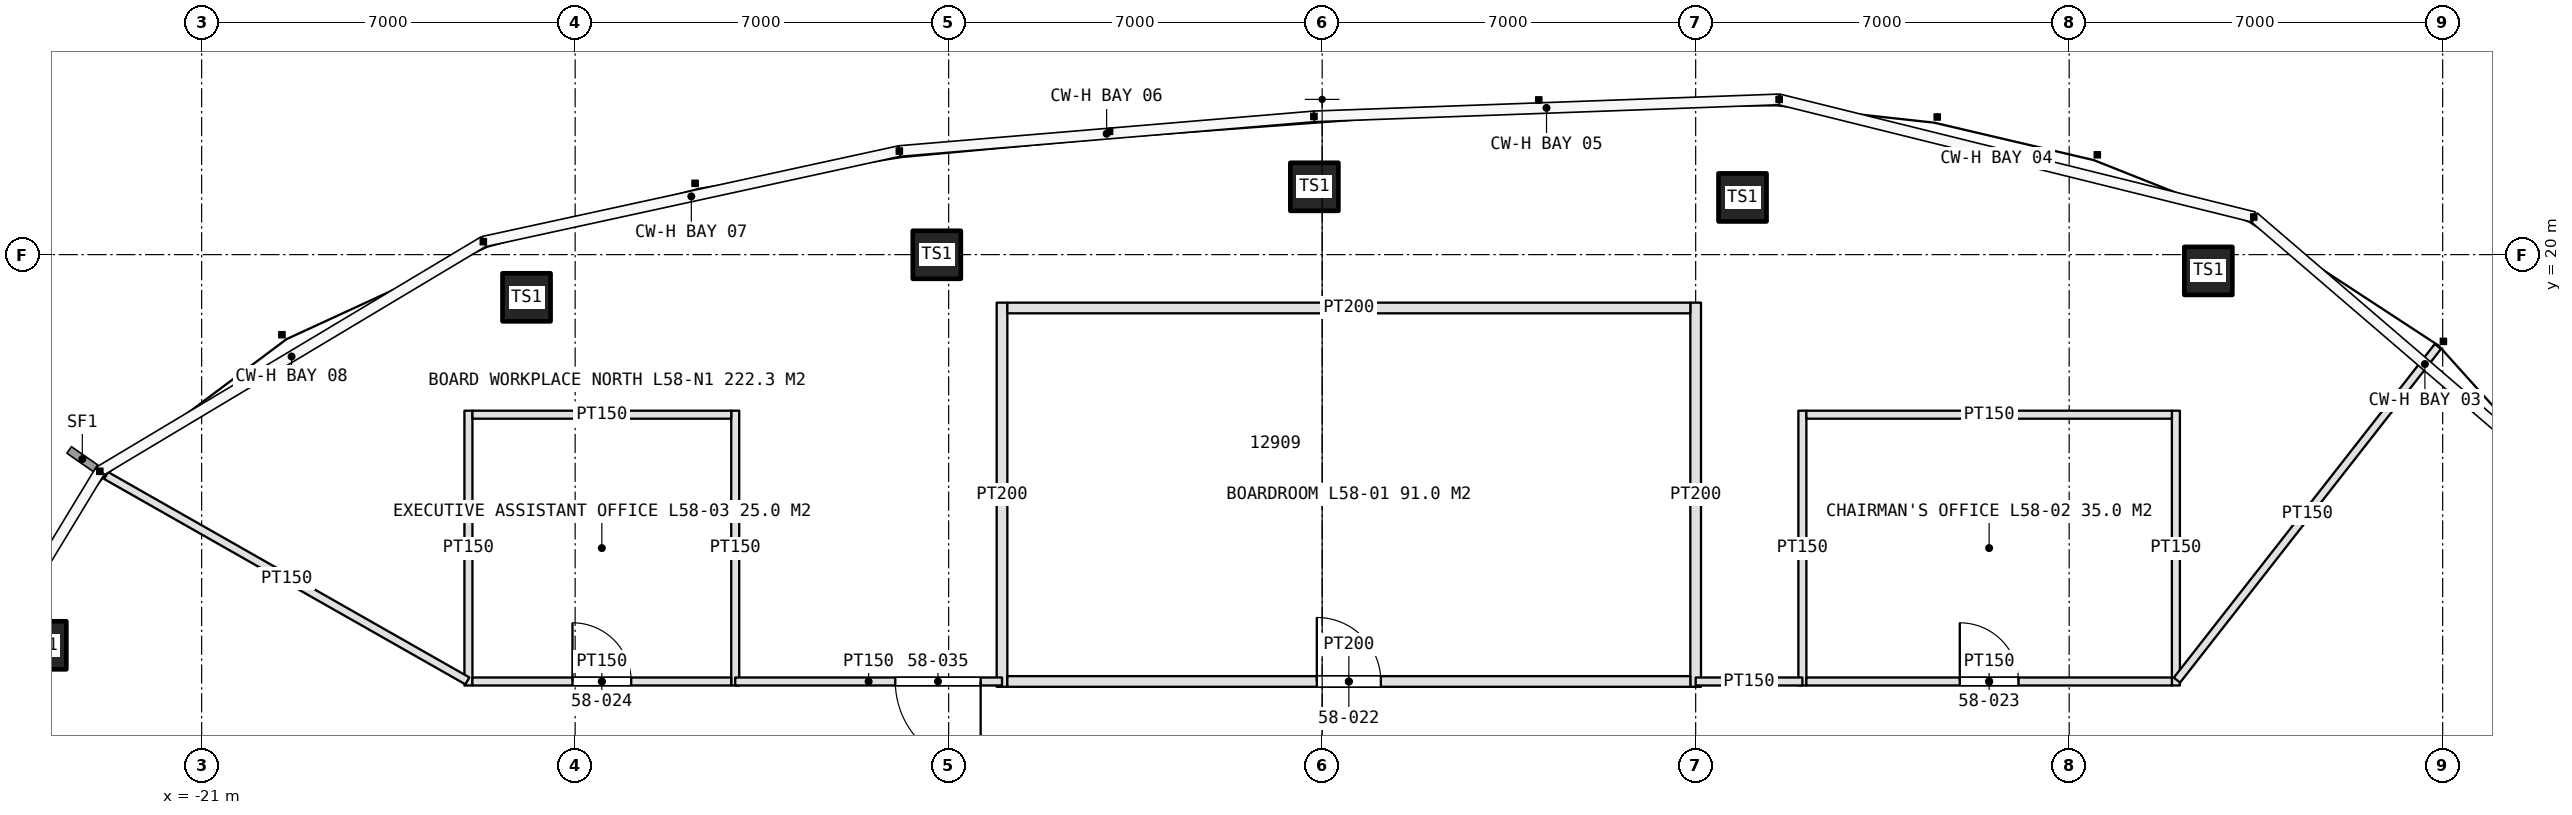
"""IFC4 building model, lengths in metres.
Left out: names, types, materials, properties, quantities, classifications, styles, units other than length and angle.
Written with IfcOpenShell. Run it as: python <this file> out.ifc"""

import sys

from ifc_helpers import new_model, si_unit, direction, frame, frame_2d, origin, origin_2d, place, context, subcontext, project, spatial, rectangle, hollow_rectangle, extrude, element, fill, save


model = new_model("IFC4")
c1 = context("Model", 3, precision=1e-05, world=origin(), true_north=direction((0.0, 1.0)))
c2 = subcontext(c1, "Body", "Model", "MODEL_VIEW")
j1 = project(units=[si_unit("LENGTHUNIT", "METRE"), si_unit("PLANEANGLEUNIT", "RADIAN")], contexts=[c1])
p1 = place(None, origin())
s1 = spatial("IfcSite", under=j1, at=p1, CompositionType="ELEMENT")
p2 = place(p1, origin())
s2 = spatial("IfcBuilding", under=s1, at=p2, CompositionType="ELEMENT")
p3 = place(p2, frame((0.0, 0.0, 262.0)))
s3 = spatial("IfcBuildingStorey", under=s2, at=p3, CompositionType="ELEMENT", Elevation=262.0)
p4 = place(p3, frame((16.608, 19.695, 0.0), z_axis=(0.0, 0.0, 1.0), x_axis=(1.0, 0.0, 0.0)))
e1 = element("IfcColumn", 1, at=p4, inside=s3, PredefinedType="COLUMN", context=c2, shape_type="SweptSolid", body=[
    extrude(hollow_rectangle(XDim=0.9, YDim=0.9, WallThickness=0.08, at=origin_2d()), origin(), (0.0, 0.0, 1.0), 3.425),
])
for number, where, z_axis, x_axis in (
    (2, (7.878, 21.072, 0.0), (0.0, 0.0, 1.0), (1.0, 0.0, 0.0)),
    (3, (-0.146, 21.271, 0.0), (0.0, 0.0, 1.0), (1.0, 0.0, 0.0)),
    (4, (-7.222, 19.997, 0.0), (0.0, 0.0, 1.0), (1.0, 0.0, 0.0)),
):
    element("IfcColumn", number, at=place(p3, frame(where, z_axis=z_axis, x_axis=x_axis)), inside=s3, PredefinedType="COLUMN", context=c2, shape_type="SweptSolid", body=[
        extrude(hollow_rectangle(XDim=0.9, YDim=0.9, WallThickness=0.08, at=origin_2d()), origin(), (0.0, 0.0, 1.0), 4.2),
    ])
for number, where, z_axis, x_axis in (
    (5, (-14.911, 19.2, 0.0), (0.0, 0.0, 1.0), (1.0, 0.0, 0.0)),
    (6, (-23.986, 12.678, 0.0), (0.0, 0.0, 1.0), (1.0, 0.0, 0.0)),
):
    element("IfcColumn", number, at=place(p3, frame(where, z_axis=z_axis, x_axis=x_axis)), inside=s3, PredefinedType="COLUMN", context=c2, shape_type="SweptSolid", body=[
        extrude(hollow_rectangle(XDim=0.9, YDim=0.9, WallThickness=0.08, at=origin_2d()), origin(), (0.0, 0.0, 1.0), 3.425),
    ])
for number, where, z_axis, x_axis in (
    (7, (-6.0, 11.9, 0.0), (0.0, 0.0, 1.0), (0.0, 1.0, 0.0)),
    (8, (7.0, 11.9, 0.0), (0.0, 0.0, 1.0), (0.0, 1.0, 0.0)),
):
    element("IfcWall", number, at=place(p3, frame(where, z_axis=z_axis, x_axis=x_axis)), inside=s3, PredefinedType="PARTITIONING", context=c2, shape_type="SweptSolid", body=[
        extrude(rectangle(XDim=7.2, YDim=0.2, at=frame_2d((3.6, 0.0))), origin(), (0.0, 0.0, 1.0), 3.0),
    ])
p5 = place(p3, frame((-5.9, 12.0, 0.0), z_axis=(0.0, 0.0, 1.0), x_axis=(1.0, 0.0, 0.0)))
e9 = element("IfcWall", 9, at=p5, inside=s3, PredefinedType="PARTITIONING", context=c2, shape_type="SweptSolid", body=[
    extrude(rectangle(XDim=12.8, YDim=0.2, at=frame_2d((6.4, 0.0))), origin(), (0.0, 0.0, 1.0), 3.0),
])
p6 = place(p5, frame((5.8, 0.0, 0.0)))
e10 = element("IfcOpeningElement", 10, at=p6, cuts=e9, PredefinedType="OPENING", context=c2, shape_type="SweptSolid", body=[
    extrude(rectangle(XDim=1.2, YDim=2.4, at=frame_2d((0.6, 1.2))), frame((0.0, 0.11, 0.0), z_axis=(0.0, -1.0, 0.0), x_axis=(1.0, 0.0, 0.0)), (0.0, 0.0, 1.0), 0.22),
])
p7 = place(p3, frame((-5.9, 19.0, 0.0), z_axis=(0.0, 0.0, 1.0), x_axis=(1.0, 0.0, 0.0)))
e11 = element("IfcWall", 11, at=p7, inside=s3, PredefinedType="PARTITIONING", context=c2, shape_type="SweptSolid", body=[
    extrude(rectangle(XDim=12.8, YDim=0.2, at=frame_2d((6.4, 0.0))), origin(), (0.0, 0.0, 1.0), 3.0),
])
for number, where, z_axis, x_axis in (
    (12, (9.0, 11.925, 0.0), (0.0, 0.0, 1.0), (0.0, 1.0, 0.0)),
    (13, (16.0, 11.925, 0.0), (0.0, 0.0, 1.0), (0.0, 1.0, 0.0)),
):
    element("IfcWall", number, at=place(p3, frame(where, z_axis=z_axis, x_axis=x_axis)), inside=s3, PredefinedType="PARTITIONING", context=c2, shape_type="SweptSolid", body=[
        extrude(rectangle(XDim=5.15, YDim=0.15, at=frame_2d((2.575, 0.0))), origin(), (0.0, 0.0, 1.0), 3.0),
    ])
p8 = place(p3, frame((9.075, 12.0, 0.0), z_axis=(0.0, 0.0, 1.0), x_axis=(1.0, 0.0, 0.0)))
e14 = element("IfcWall", 14, at=p8, inside=s3, PredefinedType="PARTITIONING", context=c2, shape_type="SweptSolid", body=[
    extrude(rectangle(XDim=6.85, YDim=0.15, at=frame_2d((3.425, 0.0))), origin(), (0.0, 0.0, 1.0), 3.0),
])
p9 = place(p8, frame((2.875, 0.0, 0.0)))
e15 = element("IfcOpeningElement", 15, at=p9, cuts=e14, PredefinedType="OPENING", context=c2, shape_type="SweptSolid", body=[
    extrude(rectangle(XDim=1.1, YDim=2.3, at=frame_2d((0.55, 1.15))), frame((0.0, 0.085, 0.0), z_axis=(0.0, -1.0, 0.0), x_axis=(1.0, 0.0, 0.0)), (0.0, 0.0, 1.0), 0.17),
])
p10 = place(p3, frame((9.075, 17.0, 0.0), z_axis=(0.0, 0.0, 1.0), x_axis=(1.0, 0.0, 0.0)))
e16 = element("IfcWall", 16, at=p10, inside=s3, PredefinedType="PARTITIONING", context=c2, shape_type="SweptSolid", body=[
    extrude(rectangle(XDim=6.85, YDim=0.15, at=frame_2d((3.425, 0.0))), origin(), (0.0, 0.0, 1.0), 3.0),
])
for number, where, z_axis, x_axis in (
    (17, (-16.0, 11.925, 0.0), (0.0, 0.0, 1.0), (0.0, 1.0, 0.0)),
    (18, (-11.0, 11.925, 0.0), (0.0, 0.0, 1.0), (0.0, 1.0, 0.0)),
):
    element("IfcWall", number, at=place(p3, frame(where, z_axis=z_axis, x_axis=x_axis)), inside=s3, PredefinedType="PARTITIONING", context=c2, shape_type="SweptSolid", body=[
        extrude(rectangle(XDim=5.15, YDim=0.15, at=frame_2d((2.575, 0.0))), origin(), (0.0, 0.0, 1.0), 3.0),
    ])
p11 = place(p3, frame((-15.925, 12.0, 0.0), z_axis=(0.0, 0.0, 1.0), x_axis=(1.0, 0.0, 0.0)))
e19 = element("IfcWall", 19, at=p11, inside=s3, PredefinedType="PARTITIONING", context=c2, shape_type="SweptSolid", body=[
    extrude(rectangle(XDim=4.85, YDim=0.15, at=frame_2d((2.425, 0.0))), origin(), (0.0, 0.0, 1.0), 3.0),
])
p12 = place(p11, frame((1.875, 0.0, 0.0)))
e20 = element("IfcOpeningElement", 20, at=p12, cuts=e19, PredefinedType="OPENING", context=c2, shape_type="SweptSolid", body=[
    extrude(rectangle(XDim=1.1, YDim=2.3, at=frame_2d((0.55, 1.15))), frame((0.0, 0.085, 0.0), z_axis=(0.0, -1.0, 0.0), x_axis=(1.0, 0.0, 0.0)), (0.0, 0.0, 1.0), 0.17),
])
p13 = place(p3, frame((-15.925, 17.0, 0.0), z_axis=(0.0, 0.0, 1.0), x_axis=(1.0, 0.0, 0.0)))
e21 = element("IfcWall", 21, at=p13, inside=s3, PredefinedType="PARTITIONING", context=c2, shape_type="SweptSolid", body=[
    extrude(rectangle(XDim=4.85, YDim=0.15, at=frame_2d((2.425, 0.0))), origin(), (0.0, 0.0, 1.0), 3.0),
])
p14 = place(p3, frame((-16.02, 12.011, 0.0), z_axis=(0.0, 0.0, 1.0), x_axis=(-0.869354026591, 0.494189818238, 0.0)))
e22 = element("IfcWall", 22, at=p14, inside=s3, PredefinedType="PARTITIONING", context=c2, shape_type="SweptSolid", body=[
    extrude(rectangle(XDim=7.788, YDim=0.15, at=frame_2d((3.894, 0.0))), origin(), (0.0, 0.0, 1.0), 3.0),
])
p15 = place(p3, frame((16.02, 12.026, 0.0), z_axis=(0.0, 0.0, 1.0), x_axis=(0.616031272047, 0.787721696959, 0.0)))
e23 = element("IfcWall", 23, at=p15, inside=s3, PredefinedType="PARTITIONING", context=c2, shape_type="SweptSolid", body=[
    extrude(rectangle(XDim=7.939, YDim=0.15, at=frame_2d((3.969, 0.0))), origin(), (0.0, 0.0, 1.0), 3.0),
])
p16 = place(p3, frame((-6.0, 12.0, 0.0), z_axis=(0.0, 0.0, 1.0), x_axis=(-1.0, 0.0, 0.0)))
e24 = element("IfcWall", 24, at=p16, inside=s3, PredefinedType="PARTITIONING", context=c2, shape_type="SweptSolid", body=[
    extrude(rectangle(XDim=5.0, YDim=0.15, at=frame_2d((2.5, 0.0))), origin(), (0.0, 0.0, 1.0), 3.0),
])
p17 = place(p16, frame((0.4, 0.0, 0.0)))
e25 = element("IfcOpeningElement", 25, at=p17, cuts=e24, PredefinedType="OPENING", context=c2, shape_type="SweptSolid", body=[
    extrude(rectangle(XDim=1.6, YDim=2.4, at=frame_2d((0.8, 1.2))), frame((0.0, 0.085, 0.0), z_axis=(0.0, -1.0, 0.0), x_axis=(1.0, 0.0, 0.0)), (0.0, 0.0, 1.0), 0.17),
])
p18 = place(p3, frame((9.0, 12.0, 0.0), z_axis=(0.0, 0.0, 1.0), x_axis=(-1.0, 0.0, 0.0)))
e26 = element("IfcWall", 26, at=p18, inside=s3, PredefinedType="PARTITIONING", context=c2, shape_type="SweptSolid", body=[
    extrude(rectangle(XDim=2.0, YDim=0.15, at=frame_2d((1.0, 0.0))), origin(), (0.0, 0.0, 1.0), 3.0),
])
p19 = place(p6, origin())
e27 = element("IfcDoor", 27, at=p19, inside=s3, OperationType="SINGLE_SWING_LEFT", PredefinedType="DOOR", context=c2, shape_type="SweptSolid", body=[
    extrude(rectangle(XDim=1.2, YDim=2.4, at=frame_2d((0.6, 1.2))), frame((0.0, 0.025, 0.0), z_axis=(0.0, -1.0, 0.0), x_axis=(1.0, 0.0, 0.0)), (0.0, 0.0, 1.0), 0.05),
])
fill(e10, e27)
p20 = place(p9, origin())
e28 = element("IfcDoor", 28, at=p20, inside=s3, OperationType="SINGLE_SWING_LEFT", PredefinedType="DOOR", context=c2, shape_type="SweptSolid", body=[
    extrude(rectangle(XDim=1.1, YDim=2.3, at=frame_2d((0.55, 1.15))), frame((0.0, 0.025, 0.0), z_axis=(0.0, -1.0, 0.0), x_axis=(1.0, 0.0, 0.0)), (0.0, 0.0, 1.0), 0.05),
])
fill(e15, e28)
p21 = place(p12, origin())
e29 = element("IfcDoor", 29, at=p21, inside=s3, OperationType="SINGLE_SWING_LEFT", PredefinedType="DOOR", context=c2, shape_type="SweptSolid", body=[
    extrude(rectangle(XDim=1.1, YDim=2.3, at=frame_2d((0.55, 1.15))), frame((0.0, 0.025, 0.0), z_axis=(0.0, -1.0, 0.0), x_axis=(1.0, 0.0, 0.0)), (0.0, 0.0, 1.0), 0.05),
])
fill(e20, e29)
p22 = place(p17, origin())
e30 = element("IfcDoor", 30, at=p22, inside=s3, OperationType="DOUBLE_DOOR_SINGLE_SWING", PredefinedType="DOOR", context=c2, shape_type="SweptSolid", body=[
    extrude(rectangle(XDim=1.6, YDim=2.4, at=frame_2d((0.8, 1.2))), frame((0.0, 0.025, 0.0), z_axis=(0.0, -1.0, 0.0), x_axis=(1.0, 0.0, 0.0)), (0.0, 0.0, 1.0), 0.05),
])
fill(e25, e30)
save(model, sys.argv[1])
